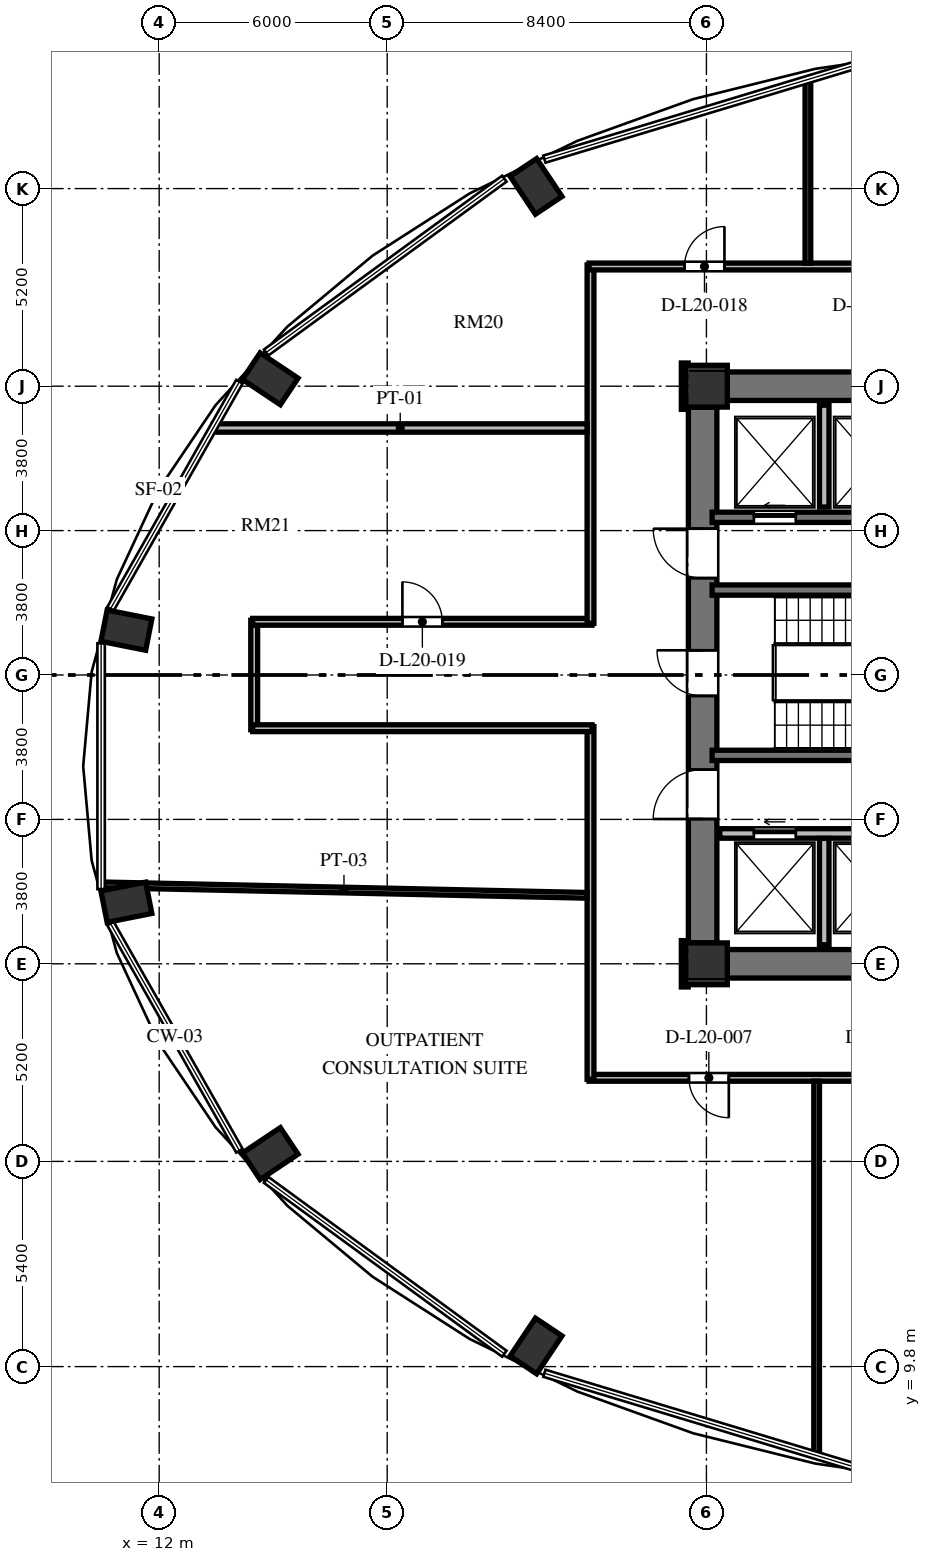
"""IFC4 building model, lengths in metres.
Left out: names, types, materials, properties, quantities, classifications, styles, units other than length and angle.
Written with IfcOpenShell. Run it as: python <this file> out.ifc"""

import sys

from ifc_helpers import new_model, si_unit, direction, frame, frame_2d, origin, origin_2d, place, context, subcontext, project, spatial, rectangle, extrude, element, fill, save


model = new_model("IFC4")
c1 = context("Model", 3, precision=1e-05, world=origin(), true_north=direction((0.0, 1.0)))
c2 = subcontext(c1, "Body", "Model", "MODEL_VIEW")
j1 = project(units=[si_unit("LENGTHUNIT", "METRE"), si_unit("PLANEANGLEUNIT", "RADIAN")], contexts=[c1])
p1 = place(None, origin())
s1 = spatial("IfcSite", under=j1, at=p1, CompositionType="ELEMENT")
p2 = place(p1, origin())
s2 = spatial("IfcBuilding", under=s1, at=p2, CompositionType="ELEMENT")
p3 = place(p2, frame((0.0, 0.0, 81.744)))
s3 = spatial("IfcBuildingStorey", under=s2, at=p3, CompositionType="ELEMENT", Elevation=81.744)
for number, where, z_axis, x_axis in (
    (1, (21.916, 40.857, 0.0), (0.0, 0.0, 1.0), (-0.556, 0.831, 0.0)),
    (2, (14.922, 35.795, 0.0), (0.0, 0.0, 1.0), (-0.831, 0.556, 0.0)),
    (3, (11.137, 29.18, 0.0), (0.0, 0.0, 1.0), (-0.981, 0.195, 0.0)),
    (4, (11.137, 22.02, 0.0), (0.0, 0.0, 1.0), (-0.981, -0.195, 0.0)),
    (5, (14.922, 15.405, 0.0), (0.0, 0.0, 1.0), (-0.831, -0.556, 0.0)),
    (6, (21.916, 10.343, 0.0), (0.0, 0.0, 1.0), (-0.556, -0.831, 0.0)),
):
    element("IfcColumn", number, at=place(p3, frame(where, z_axis=z_axis, x_axis=x_axis)), inside=s3, PredefinedType="COLUMN", context=c2, shape_type="SweptSolid", body=[
        extrude(rectangle(XDim=1.2, YDim=0.84, at=origin_2d()), origin(), (0.0, 0.0, 1.0), 3.648),
    ])
for number, where, z_axis, x_axis in (
    (7, (26.4, 20.4, 0.0), (0.0, 0.0, 1.0), (1.0, 0.0, 0.0)),
    (8, (26.4, 35.6, 0.0), (0.0, 0.0, 1.0), (1.0, 0.0, 0.0)),
):
    element("IfcColumn", number, at=place(p3, frame(where, z_axis=z_axis, x_axis=x_axis)), inside=s3, PredefinedType="COLUMN", context=c2, shape_type="SweptSolid", body=[
        extrude(rectangle(XDim=1.1, YDim=1.1, at=origin_2d()), origin(), (0.0, 0.0, 1.0), 3.648),
    ])
p4 = place(p3, frame((26.3, 20.95, 0.0), z_axis=(0.0, 0.0, 1.0), x_axis=(0.0, 1.0, 0.0)))
e9 = element("IfcWall", 9, at=p4, inside=s3, PredefinedType="SHEAR", context=c2, shape_type="SweptSolid", body=[
    extrude(rectangle(XDim=14.1, YDim=0.75, at=frame_2d((7.05, 0.0))), origin(), (0.0, 0.0, 1.0), 3.648),
])
p5 = place(p4, frame((6.5, 0.0, 0.0)))
e10 = element("IfcOpeningElement", 10, at=p5, cuts=e9, PredefinedType="OPENING", context=c2, shape_type="SweptSolid", body=[
    extrude(rectangle(XDim=1.2, YDim=2.15, at=frame_2d((0.6, 1.075))), frame((0.0, 0.385, 0.0), z_axis=(0.0, -1.0, 0.0), x_axis=(1.0, 0.0, 0.0)), (0.0, 0.0, 1.0), 0.77),
])
p6 = place(p4, frame((9.6, 0.0, 0.0)))
e11 = element("IfcOpeningElement", 11, at=p6, cuts=e9, PredefinedType="OPENING", context=c2, shape_type="SweptSolid", body=[
    extrude(rectangle(XDim=1.3, YDim=2.2, at=frame_2d((0.65, 1.1))), frame((0.0, 0.385, 0.0), z_axis=(0.0, -1.0, 0.0), x_axis=(1.0, 0.0, 0.0)), (0.0, 0.0, 1.0), 0.77),
])
p7 = place(p4, frame((3.26, 0.0, 0.0)))
e12 = element("IfcOpeningElement", 12, at=p7, cuts=e9, PredefinedType="OPENING", context=c2, shape_type="SweptSolid", body=[
    extrude(rectangle(XDim=1.3, YDim=2.2, at=frame_2d((0.65, 1.1))), frame((0.0, 0.385, 0.0), z_axis=(0.0, -1.0, 0.0), x_axis=(1.0, 0.0, 0.0)), (0.0, 0.0, 1.0), 0.77),
])
for number, where, z_axis, x_axis in (
    (13, (26.95, 20.4, 0.0), (0.0, 0.0, 1.0), (1.0, 0.0, 0.0)),
    (14, (26.95, 35.6, 0.0), (0.0, 0.0, 1.0), (1.0, 0.0, 0.0)),
):
    element("IfcWall", number, at=place(p3, frame(where, z_axis=z_axis, x_axis=x_axis)), inside=s3, PredefinedType="SHEAR", context=c2, shape_type="SweptSolid", body=[
        extrude(rectangle(XDim=5.375, YDim=0.75, at=frame_2d((2.688, 0.0))), origin(), (0.0, 0.0, 1.0), 3.648),
    ])
for number, where, z_axis, x_axis in (
    (15, (26.55, 30.235, 0.0), (0.0, 0.0, 1.0), (1.0, 0.0, 0.0)),
    (16, (26.55, 25.885, 0.0), (0.0, 0.0, 1.0), (1.0, 0.0, 0.0)),
):
    element("IfcWall", number, at=place(p3, frame(where, z_axis=z_axis, x_axis=x_axis)), inside=s3, PredefinedType="SHEAR", context=c2, shape_type="SweptSolid", body=[
        extrude(rectangle(XDim=7.985, YDim=0.27, at=frame_2d((3.992, 0.0))), origin(), (0.0, 0.0, 1.0), 3.648),
    ])
p8 = place(p3, frame((26.55, 32.15, 0.0), z_axis=(0.0, 0.0, 1.0), x_axis=(1.0, 0.0, 0.0)))
e17 = element("IfcWall", 17, at=p8, inside=s3, PredefinedType="SHEAR", context=c2, shape_type="SweptSolid", body=[
    extrude(rectangle(XDim=16.4, YDim=0.27, at=frame_2d((8.2, 0.0))), origin(), (0.0, 0.0, 1.0), 3.648),
])
p9 = place(p8, frame((1.1, 0.0, 0.0)))
e18 = element("IfcOpeningElement", 18, at=p9, cuts=e17, PredefinedType="OPENING", context=c2, shape_type="SweptSolid", body=[
    extrude(rectangle(XDim=1.1, YDim=2.2, at=frame_2d((0.55, 1.1))), frame((0.0, 0.145, 0.0), z_axis=(0.0, -1.0, 0.0), x_axis=(1.0, 0.0, 0.0)), (0.0, 0.0, 1.0), 0.29),
])
p10 = place(p8, frame((3.7, 0.0, 0.0)))
e19 = element("IfcOpeningElement", 19, at=p10, cuts=e17, PredefinedType="OPENING", context=c2, shape_type="SweptSolid", body=[
    extrude(rectangle(XDim=1.1, YDim=2.2, at=frame_2d((0.55, 1.1))), frame((0.0, 0.145, 0.0), z_axis=(0.0, -1.0, 0.0), x_axis=(1.0, 0.0, 0.0)), (0.0, 0.0, 1.0), 0.29),
])
p11 = place(p8, frame((6.5, 0.0, 0.0)))
e20 = element("IfcOpeningElement", 20, at=p11, cuts=e17, PredefinedType="OPENING", context=c2, shape_type="SweptSolid", body=[
    extrude(rectangle(XDim=1.1, YDim=2.2, at=frame_2d((0.55, 1.1))), frame((0.0, 0.145, 0.0), z_axis=(0.0, -1.0, 0.0), x_axis=(1.0, 0.0, 0.0)), (0.0, 0.0, 1.0), 0.29),
])
p12 = place(p8, frame((9.1, 0.0, 0.0)))
e21 = element("IfcOpeningElement", 21, at=p12, cuts=e17, PredefinedType="OPENING", context=c2, shape_type="SweptSolid", body=[
    extrude(rectangle(XDim=1.1, YDim=2.2, at=frame_2d((0.55, 1.1))), frame((0.0, 0.145, 0.0), z_axis=(0.0, -1.0, 0.0), x_axis=(1.0, 0.0, 0.0)), (0.0, 0.0, 1.0), 0.29),
])
p13 = place(p8, frame((11.9, 0.0, 0.0)))
e22 = element("IfcOpeningElement", 22, at=p13, cuts=e17, PredefinedType="OPENING", context=c2, shape_type="SweptSolid", body=[
    extrude(rectangle(XDim=1.1, YDim=2.2, at=frame_2d((0.55, 1.1))), frame((0.0, 0.145, 0.0), z_axis=(0.0, -1.0, 0.0), x_axis=(1.0, 0.0, 0.0)), (0.0, 0.0, 1.0), 0.29),
])
p14 = place(p8, frame((14.5, 0.0, 0.0)))
e23 = element("IfcOpeningElement", 23, at=p14, cuts=e17, PredefinedType="OPENING", context=c2, shape_type="SweptSolid", body=[
    extrude(rectangle(XDim=1.1, YDim=2.2, at=frame_2d((0.55, 1.1))), frame((0.0, 0.145, 0.0), z_axis=(0.0, -1.0, 0.0), x_axis=(1.0, 0.0, 0.0)), (0.0, 0.0, 1.0), 0.29),
])
p15 = place(p3, frame((26.75, 23.83, 0.0), z_axis=(0.0, 0.0, 1.0), x_axis=(1.0, 0.0, 0.0)))
e24 = element("IfcWall", 24, at=p15, inside=s3, PredefinedType="SOLIDWALL", context=c2, shape_type="SweptSolid", body=[
    extrude(rectangle(XDim=16.2, YDim=0.25, at=frame_2d((8.1, 0.0))), origin(), (0.0, 0.0, 1.0), 3.428),
])
p16 = place(p15, frame((0.9, 0.0, 0.0)))
e25 = element("IfcOpeningElement", 25, at=p16, cuts=e24, PredefinedType="OPENING", context=c2, shape_type="SweptSolid", body=[
    extrude(rectangle(XDim=1.1, YDim=2.2, at=frame_2d((0.55, 1.1))), frame((0.0, 0.135, 0.0), z_axis=(0.0, -1.0, 0.0), x_axis=(1.0, 0.0, 0.0)), (0.0, 0.0, 1.0), 0.27),
])
p17 = place(p15, frame((3.5, 0.0, 0.0)))
e26 = element("IfcOpeningElement", 26, at=p17, cuts=e24, PredefinedType="OPENING", context=c2, shape_type="SweptSolid", body=[
    extrude(rectangle(XDim=1.1, YDim=2.2, at=frame_2d((0.55, 1.1))), frame((0.0, 0.135, 0.0), z_axis=(0.0, -1.0, 0.0), x_axis=(1.0, 0.0, 0.0)), (0.0, 0.0, 1.0), 0.27),
])
p18 = place(p15, frame((6.3, 0.0, 0.0)))
e27 = element("IfcOpeningElement", 27, at=p18, cuts=e24, PredefinedType="OPENING", context=c2, shape_type="SweptSolid", body=[
    extrude(rectangle(XDim=1.1, YDim=2.2, at=frame_2d((0.55, 1.1))), frame((0.0, 0.135, 0.0), z_axis=(0.0, -1.0, 0.0), x_axis=(1.0, 0.0, 0.0)), (0.0, 0.0, 1.0), 0.27),
])
p19 = place(p15, frame((8.9, 0.0, 0.0)))
e28 = element("IfcOpeningElement", 28, at=p19, cuts=e24, PredefinedType="OPENING", context=c2, shape_type="SweptSolid", body=[
    extrude(rectangle(XDim=1.1, YDim=2.2, at=frame_2d((0.55, 1.1))), frame((0.0, 0.135, 0.0), z_axis=(0.0, -1.0, 0.0), x_axis=(1.0, 0.0, 0.0)), (0.0, 0.0, 1.0), 0.27),
])
p20 = place(p15, frame((11.7, 0.0, 0.0)))
e29 = element("IfcOpeningElement", 29, at=p20, cuts=e24, PredefinedType="OPENING", context=c2, shape_type="SweptSolid", body=[
    extrude(rectangle(XDim=1.1, YDim=2.2, at=frame_2d((0.55, 1.1))), frame((0.0, 0.135, 0.0), z_axis=(0.0, -1.0, 0.0), x_axis=(1.0, 0.0, 0.0)), (0.0, 0.0, 1.0), 0.27),
])
p21 = place(p15, frame((14.15, 0.0, 0.0)))
e30 = element("IfcOpeningElement", 30, at=p21, cuts=e24, PredefinedType="OPENING", context=c2, shape_type="SweptSolid", body=[
    extrude(rectangle(XDim=1.4, YDim=2.3, at=frame_2d((0.7, 1.15))), frame((0.0, 0.135, 0.0), z_axis=(0.0, -1.0, 0.0), x_axis=(1.0, 0.0, 0.0)), (0.0, 0.0, 1.0), 0.27),
])
p22 = place(p3, frame((29.5, 32.42, 0.0), z_axis=(0.0, 0.0, 1.0), x_axis=(0.0, 1.0, 0.0)))
e31 = element("IfcWall", 31, at=p22, inside=s3, PredefinedType="SOLIDWALL", context=c2, shape_type="SweptSolid", body=[
    extrude(rectangle(XDim=2.68, YDim=0.25, at=frame_2d((1.34, 0.0))), origin(), (0.0, 0.0, 1.0), 3.428),
])
p23 = place(p3, frame((29.5, 20.9, 0.0), z_axis=(0.0, 0.0, 1.0), x_axis=(0.0, 1.0, 0.0)))
e32 = element("IfcWall", 32, at=p23, inside=s3, PredefinedType="SOLIDWALL", context=c2, shape_type="SweptSolid", body=[
    extrude(rectangle(XDim=2.8, YDim=0.25, at=frame_2d((1.4, 0.0))), origin(), (0.0, 0.0, 1.0), 3.428),
])
p24 = place(p3, frame((14.5, 26.56, 0.0), z_axis=(0.0, 0.0, 1.0), x_axis=(0.0, 1.0, 0.0)))
e33 = element("IfcWall", 33, at=p24, inside=s3, PredefinedType="PARTITIONING", context=c2, shape_type="SweptSolid", body=[
    extrude(rectangle(XDim=2.88, YDim=0.18, at=frame_2d((1.44, 0.0))), origin(), (0.0, 0.0, 1.0), 3.013),
])
p25 = place(p3, frame((14.46, 29.4, 0.0), z_axis=(0.0, 0.0, 1.0), x_axis=(1.0, 0.0, 0.0)))
e34 = element("IfcWall", 34, at=p25, inside=s3, PredefinedType="PARTITIONING", context=c2, shape_type="SweptSolid", body=[
    extrude(rectangle(XDim=8.93, YDim=0.18, at=frame_2d((4.465, 0.0))), origin(), (0.0, 0.0, 1.0), 3.428),
])
p26 = place(p25, frame((3.94, 0.0, 0.0)))
e35 = element("IfcOpeningElement", 35, at=p26, cuts=e34, PredefinedType="OPENING", context=c2, shape_type="SweptSolid", body=[
    extrude(rectangle(XDim=1.05, YDim=2.15, at=frame_2d((0.525, 1.075))), frame((0.0, 0.1, 0.0), z_axis=(0.0, -1.0, 0.0), x_axis=(1.0, 0.0, 0.0)), (0.0, 0.0, 1.0), 0.2),
])
p27 = place(p3, frame((23.35, 29.36, 0.0), z_axis=(0.0, 0.0, 1.0), x_axis=(0.0, 1.0, 0.0)))
e36 = element("IfcWall", 36, at=p27, inside=s3, PredefinedType="PARTITIONING", context=c2, shape_type="SweptSolid", body=[
    extrude(rectangle(XDim=9.43, YDim=0.18, at=frame_2d((4.715, 0.0))), origin(), (0.0, 0.0, 1.0), 3.428),
])
p28 = place(p3, frame((23.31, 38.75, 0.0), z_axis=(0.0, 0.0, 1.0), x_axis=(1.0, 0.0, 0.0)))
e37 = element("IfcWall", 37, at=p28, inside=s3, PredefinedType="PARTITIONING", context=c2, shape_type="SweptSolid", body=[
    extrude(rectangle(XDim=29.88, YDim=0.18, at=frame_2d((14.94, 0.0))), origin(), (0.0, 0.0, 1.0), 3.053),
])
p29 = place(p28, frame((26.066, 0.0, 0.0)))
e38 = element("IfcOpeningElement", 38, at=p29, cuts=e37, PredefinedType="OPENING", context=c2, shape_type="SweptSolid", body=[
    extrude(rectangle(XDim=1.05, YDim=2.15, at=frame_2d((0.525, 1.075))), frame((0.0, 0.1, 0.0), z_axis=(0.0, -1.0, 0.0), x_axis=(1.0, 0.0, 0.0)), (0.0, 0.0, 1.0), 0.2),
])
p30 = place(p28, frame((21.31, 0.0, 0.0)))
e39 = element("IfcOpeningElement", 39, at=p30, cuts=e37, PredefinedType="OPENING", context=c2, shape_type="SweptSolid", body=[
    extrude(rectangle(XDim=1.05, YDim=2.15, at=frame_2d((0.525, 1.075))), frame((0.0, 0.1, 0.0), z_axis=(0.0, -1.0, 0.0), x_axis=(1.0, 0.0, 0.0)), (0.0, 0.0, 1.0), 0.2),
])
p31 = place(p28, frame((17.74, 0.0, 0.0)))
e40 = element("IfcOpeningElement", 40, at=p31, cuts=e37, PredefinedType="OPENING", context=c2, shape_type="SweptSolid", body=[
    extrude(rectangle(XDim=1.05, YDim=2.15, at=frame_2d((0.525, 1.075))), frame((0.0, 0.1, 0.0), z_axis=(0.0, -1.0, 0.0), x_axis=(1.0, 0.0, 0.0)), (0.0, 0.0, 1.0), 0.2),
])
p32 = place(p28, frame((12.38, 0.0, 0.0)))
e41 = element("IfcOpeningElement", 41, at=p32, cuts=e37, PredefinedType="OPENING", context=c2, shape_type="SweptSolid", body=[
    extrude(rectangle(XDim=1.05, YDim=2.15, at=frame_2d((0.525, 1.075))), frame((0.0, 0.1, 0.0), z_axis=(0.0, -1.0, 0.0), x_axis=(1.0, 0.0, 0.0)), (0.0, 0.0, 1.0), 0.2),
])
p33 = place(p28, frame((7.02, 0.0, 0.0)))
e42 = element("IfcOpeningElement", 42, at=p33, cuts=e37, PredefinedType="OPENING", context=c2, shape_type="SweptSolid", body=[
    extrude(rectangle(XDim=1.05, YDim=2.15, at=frame_2d((0.525, 1.075))), frame((0.0, 0.1, 0.0), z_axis=(0.0, -1.0, 0.0), x_axis=(1.0, 0.0, 0.0)), (0.0, 0.0, 1.0), 0.2),
])
p34 = place(p28, frame((2.514, 0.0, 0.0)))
e43 = element("IfcOpeningElement", 43, at=p34, cuts=e37, PredefinedType="OPENING", context=c2, shape_type="SweptSolid", body=[
    extrude(rectangle(XDim=1.05, YDim=2.15, at=frame_2d((0.525, 1.075))), frame((0.0, 0.1, 0.0), z_axis=(0.0, -1.0, 0.0), x_axis=(1.0, 0.0, 0.0)), (0.0, 0.0, 1.0), 0.2),
])
for number, where, z_axis, x_axis in (
    (44, (25.83, 36.21, 0.0), (0.0, 0.0, 1.0), (0.0, -1.0, 0.0)),
    (45, (25.83, 21.01, 0.0), (0.0, 0.0, 1.0), (0.0, -1.0, 0.0)),
):
    element("IfcWall", number, at=place(p3, frame(where, z_axis=z_axis, x_axis=x_axis)), inside=s3, PredefinedType="PARTITIONING", context=c2, shape_type="SweptSolid", body=[
        extrude(rectangle(XDim=1.22, YDim=0.18, at=frame_2d((0.61, 0.0))), origin(), (0.0, 0.0, 1.0), 3.428),
    ])
p35 = place(p3, frame((45.24, 17.4, 0.0), z_axis=(0.0, 0.0, 1.0), x_axis=(-1.0, 0.0, 0.0)))
e46 = element("IfcWall", 46, at=p35, inside=s3, PredefinedType="PARTITIONING", context=c2, shape_type="SweptSolid", body=[
    extrude(rectangle(XDim=21.93, YDim=0.18, at=frame_2d((10.965, 0.0))), origin(), (0.0, 0.0, 1.0), 3.053),
])
p36 = place(p35, frame((18.251, 0.0, 0.0)))
e47 = element("IfcOpeningElement", 47, at=p36, cuts=e46, PredefinedType="OPENING", context=c2, shape_type="SweptSolid", body=[
    extrude(rectangle(XDim=1.05, YDim=2.15, at=frame_2d((0.525, 1.075))), frame((0.0, 0.1, 0.0), z_axis=(0.0, -1.0, 0.0), x_axis=(1.0, 0.0, 0.0)), (0.0, 0.0, 1.0), 0.2),
])
p37 = place(p35, frame((13.515, 0.0, 0.0)))
e48 = element("IfcOpeningElement", 48, at=p37, cuts=e46, PredefinedType="OPENING", context=c2, shape_type="SweptSolid", body=[
    extrude(rectangle(XDim=1.05, YDim=2.15, at=frame_2d((0.525, 1.075))), frame((0.0, 0.1, 0.0), z_axis=(0.0, -1.0, 0.0), x_axis=(1.0, 0.0, 0.0)), (0.0, 0.0, 1.0), 0.2),
])
p38 = place(p35, frame((9.515, 0.0, 0.0)))
e49 = element("IfcOpeningElement", 49, at=p38, cuts=e46, PredefinedType="OPENING", context=c2, shape_type="SweptSolid", body=[
    extrude(rectangle(XDim=1.05, YDim=2.15, at=frame_2d((0.525, 1.075))), frame((0.0, 0.1, 0.0), z_axis=(0.0, -1.0, 0.0), x_axis=(1.0, 0.0, 0.0)), (0.0, 0.0, 1.0), 0.2),
])
p39 = place(p35, frame((4.743, 0.0, 0.0)))
e50 = element("IfcOpeningElement", 50, at=p39, cuts=e46, PredefinedType="OPENING", context=c2, shape_type="SweptSolid", body=[
    extrude(rectangle(XDim=1.4, YDim=2.2, at=frame_2d((0.7, 1.1))), frame((0.0, 0.1, 0.0), z_axis=(0.0, -1.0, 0.0), x_axis=(1.0, 0.0, 0.0)), (0.0, 0.0, 1.0), 0.2),
])
p40 = place(p35, frame((1.907, 0.0, 0.0)))
e51 = element("IfcOpeningElement", 51, at=p40, cuts=e46, PredefinedType="OPENING", context=c2, shape_type="SweptSolid", body=[
    extrude(rectangle(XDim=1.05, YDim=2.15, at=frame_2d((0.525, 1.075))), frame((0.0, 0.1, 0.0), z_axis=(0.0, -1.0, 0.0), x_axis=(1.0, 0.0, 0.0)), (0.0, 0.0, 1.0), 0.2),
])
p41 = place(p3, frame((23.35, 17.36, 0.0), z_axis=(0.0, 0.0, 1.0), x_axis=(0.0, 1.0, 0.0)))
e52 = element("IfcWall", 52, at=p41, inside=s3, PredefinedType="PARTITIONING", context=c2, shape_type="SweptSolid", body=[
    extrude(rectangle(XDim=9.28, YDim=0.18, at=frame_2d((4.64, 0.0))), origin(), (0.0, 0.0, 1.0), 3.428),
])
p42 = place(p3, frame((23.39, 26.6, 0.0), z_axis=(0.0, 0.0, 1.0), x_axis=(-1.0, 0.0, 0.0)))
e53 = element("IfcWall", 53, at=p42, inside=s3, PredefinedType="PARTITIONING", context=c2, shape_type="SweptSolid", body=[
    extrude(rectangle(XDim=8.93, YDim=0.18, at=frame_2d((4.465, 0.0))), origin(), (0.0, 0.0, 1.0), 3.428),
])
p43 = place(p3, frame((10.465, 22.479, 0.0), z_axis=(0.0, 0.0, 1.0), x_axis=(0.999765147572, -0.021671402821, 0.0)))
e54 = element("IfcWall", 54, at=p43, inside=s3, PredefinedType="PARTITIONING", context=c2, shape_type="SweptSolid", body=[
    extrude(rectangle(XDim=12.798, YDim=0.15, at=frame_2d((6.399, 0.0))), origin(), (0.0, 0.0, 1.0), 3.428),
])
p44 = place(p3, frame((13.426, 34.5, 0.0), z_axis=(0.0, 0.0, 1.0), x_axis=(1.0, 0.0, 0.0)))
e55 = element("IfcWall", 55, at=p44, inside=s3, PredefinedType="PARTITIONING", context=c2, shape_type="SweptSolid", body=[
    extrude(rectangle(XDim=9.834, YDim=0.22, at=frame_2d((4.917, 0.0))), origin(), (0.0, 0.0, 1.0), 3.428),
])
p45 = place(p3, frame((29.07, 38.84, 0.0), z_axis=(0.0, 0.0, 1.0), x_axis=(0.0, 1.0, 0.0)))
e56 = element("IfcWall", 56, at=p45, inside=s3, PredefinedType="PARTITIONING", context=c2, shape_type="SweptSolid", body=[
    extrude(rectangle(XDim=4.817, YDim=0.15, at=frame_2d((2.409, 0.0))), origin(), (0.0, 0.0, 1.0), 3.428),
])
p46 = place(p3, frame((29.3, 7.473, 0.0), z_axis=(0.0, 0.0, 1.0), x_axis=(0.0, 1.0, 0.0)))
e57 = element("IfcWall", 57, at=p46, inside=s3, PredefinedType="PARTITIONING", context=c2, shape_type="SweptSolid", body=[
    extrude(rectangle(XDim=9.837, YDim=0.15, at=frame_2d((4.918, 0.0))), origin(), (0.0, 0.0, 1.0), 3.428),
])
p47 = place(p5, origin())
e58 = element("IfcDoor", 58, at=p47, inside=s3, OperationType="SINGLE_SWING_RIGHT", PredefinedType="DOOR", context=c2, shape_type="SweptSolid", body=[
    extrude(rectangle(XDim=1.2, YDim=2.15, at=frame_2d((0.6, 1.075))), frame((0.0, 0.025, 0.0), z_axis=(0.0, -1.0, 0.0), x_axis=(1.0, 0.0, 0.0)), (0.0, 0.0, 1.0), 0.05),
])
fill(e10, e58)
p48 = place(p6, origin())
e59 = element("IfcDoor", 59, at=p48, inside=s3, OperationType="SINGLE_SWING_RIGHT", PredefinedType="DOOR", context=c2, shape_type="SweptSolid", body=[
    extrude(rectangle(XDim=1.3, YDim=2.2, at=frame_2d((0.65, 1.1))), frame((0.0, 0.025, 0.0), z_axis=(0.0, -1.0, 0.0), x_axis=(1.0, 0.0, 0.0)), (0.0, 0.0, 1.0), 0.05),
])
fill(e11, e59)
p49 = place(p7, origin())
e60 = element("IfcDoor", 60, at=p49, inside=s3, OperationType="SINGLE_SWING_LEFT", PredefinedType="DOOR", context=c2, shape_type="SweptSolid", body=[
    extrude(rectangle(XDim=1.3, YDim=2.2, at=frame_2d((0.65, 1.1))), frame((0.0, 0.025, 0.0), z_axis=(0.0, -1.0, 0.0), x_axis=(1.0, 0.0, 0.0)), (0.0, 0.0, 1.0), 0.05),
])
fill(e12, e60)
p50 = place(p9, origin())
e61 = element("IfcDoor", 61, at=p50, inside=s3, OperationType="SLIDING_TO_LEFT", PredefinedType="DOOR", context=c2, shape_type="SweptSolid", body=[
    extrude(rectangle(XDim=1.1, YDim=2.2, at=frame_2d((0.55, 1.1))), frame((0.0, 0.025, 0.0), z_axis=(0.0, -1.0, 0.0), x_axis=(1.0, 0.0, 0.0)), (0.0, 0.0, 1.0), 0.05),
])
fill(e18, e61)
p51 = place(p16, origin())
e62 = element("IfcDoor", 62, at=p51, inside=s3, OperationType="SLIDING_TO_LEFT", PredefinedType="DOOR", context=c2, shape_type="SweptSolid", body=[
    extrude(rectangle(XDim=1.1, YDim=2.2, at=frame_2d((0.55, 1.1))), frame((0.0, 0.025, 0.0), z_axis=(0.0, -1.0, 0.0), x_axis=(1.0, 0.0, 0.0)), (0.0, 0.0, 1.0), 0.05),
])
fill(e25, e62)
p52 = place(p36, origin())
e63 = element("IfcDoor", 63, at=p52, inside=s3, OperationType="SINGLE_SWING_LEFT", PredefinedType="DOOR", context=c2, shape_type="SweptSolid", body=[
    extrude(rectangle(XDim=1.05, YDim=2.15, at=frame_2d((0.525, 1.075))), frame((0.0, 0.025, 0.0), z_axis=(0.0, -1.0, 0.0), x_axis=(1.0, 0.0, 0.0)), (0.0, 0.0, 1.0), 0.05),
])
fill(e47, e63)
p53 = place(p34, origin())
e64 = element("IfcDoor", 64, at=p53, inside=s3, OperationType="SINGLE_SWING_RIGHT", PredefinedType="DOOR", context=c2, shape_type="SweptSolid", body=[
    extrude(rectangle(XDim=1.05, YDim=2.15, at=frame_2d((0.525, 1.075))), frame((0.0, 0.025, 0.0), z_axis=(0.0, -1.0, 0.0), x_axis=(1.0, 0.0, 0.0)), (0.0, 0.0, 1.0), 0.05),
])
fill(e43, e64)
p54 = place(p26, origin())
e65 = element("IfcDoor", 65, at=p54, inside=s3, OperationType="SINGLE_SWING_LEFT", PredefinedType="DOOR", context=c2, shape_type="SweptSolid", body=[
    extrude(rectangle(XDim=1.05, YDim=2.15, at=frame_2d((0.525, 1.075))), frame((0.0, 0.025, 0.0), z_axis=(0.0, -1.0, 0.0), x_axis=(1.0, 0.0, 0.0)), (0.0, 0.0, 1.0), 0.05),
])
fill(e35, e65)
save(model, sys.argv[1])
